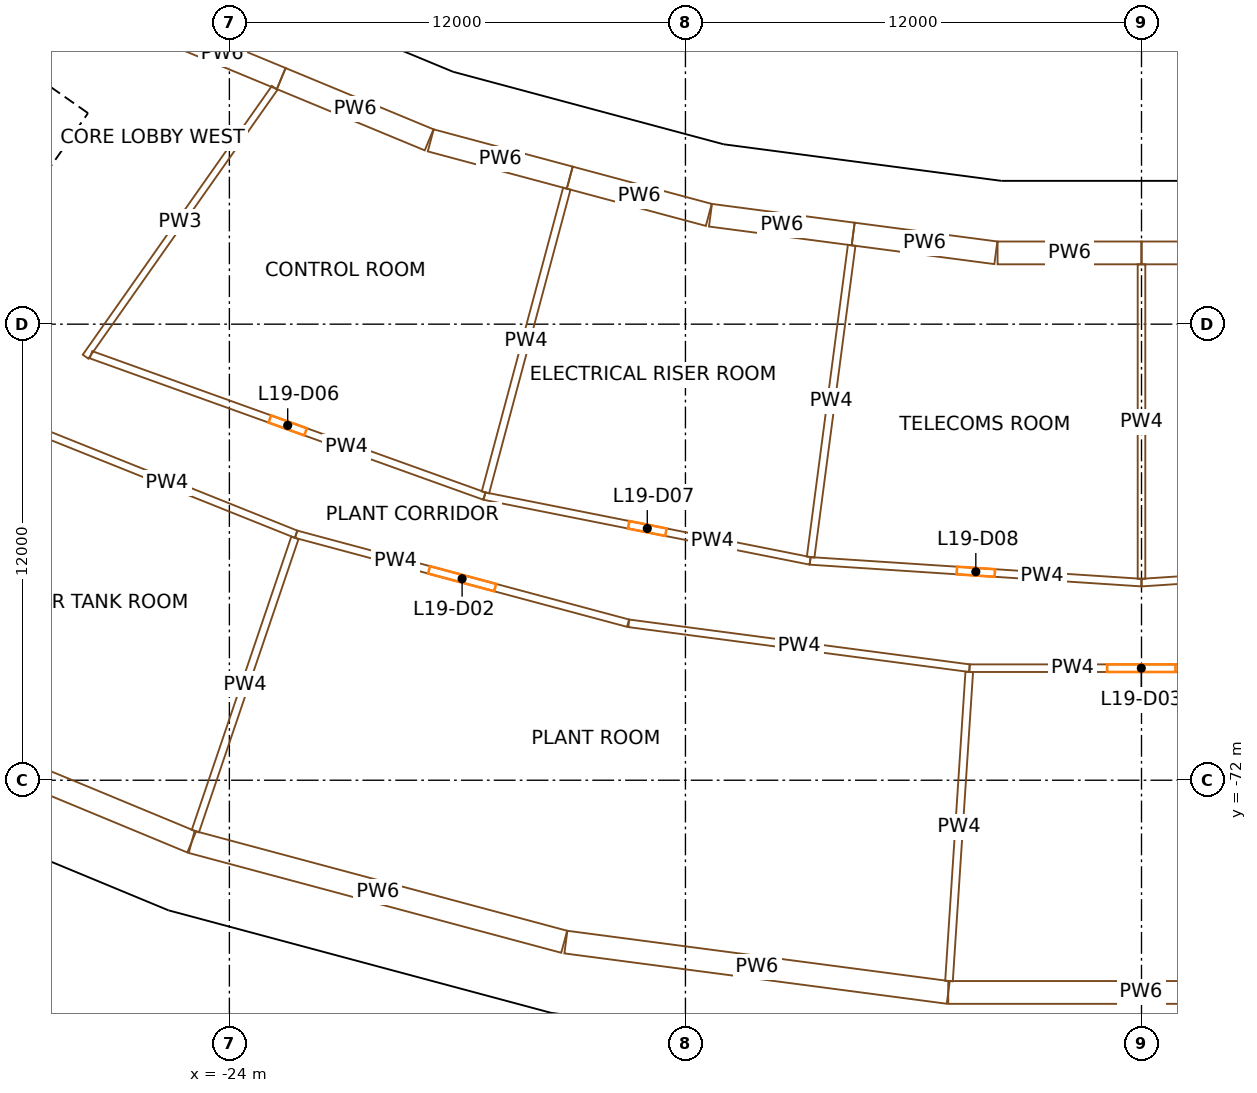
"""IFC4 building model, lengths in metres.
Left out: names, types, materials, properties, quantities, classifications, styles, units other than length and angle.
Written with IfcOpenShell. Run it as: python <this file> out.ifc"""

import sys

from ifc_helpers import new_model, si_unit, direction, frame, frame_2d, origin, origin_2d, place, context, subcontext, project, spatial, rectangle, extrude, element, fill, save


model = new_model("IFC4")
c1 = context("Model", 3, precision=1e-05, world=origin(), true_north=direction((0.0, 1.0)))
c2 = subcontext(c1, "Body", "Model", "MODEL_VIEW")
j1 = project(units=[si_unit("LENGTHUNIT", "METRE"), si_unit("PLANEANGLEUNIT", "RADIAN")], contexts=[c1])
p1 = place(None, origin())
s1 = spatial("IfcSite", under=j1, at=p1, CompositionType="ELEMENT")
p2 = place(p1, origin())
s2 = spatial("IfcBuilding", under=s1, at=p2, CompositionType="ELEMENT")
p3 = place(p2, frame((0.0, 0.0, 89.9)))
s3 = spatial("IfcBuildingStorey", under=s2, at=p3, CompositionType="ELEMENT", Elevation=89.9)
for number, where, z_axis, x_axis in (
    (1, (-25.763, -52.243, 0.0), (0.0, 0.0, 1.0), (0.897, -0.442, 0.0)),
    (2, (-18.724, -55.159, 0.0), (0.0, 0.0, 1.0), (0.947, -0.321, 0.0)),
    (3, (-24.992, -73.624, 0.0), (0.0, 0.0, 1.0), (0.947, -0.321, 0.0)),
    (4, (-11.364, -57.131, 0.0), (0.0, 0.0, 1.0), (0.981, -0.195, 0.0)),
    (5, (-15.168, -76.256, 0.0), (0.0, 0.0, 1.0), (0.981, -0.195, 0.0)),
    (6, (-3.81, -58.125, 0.0), (0.0, 0.0, 1.0), (0.998, -0.065, 0.0)),
    (7, (-5.085, -77.583, 0.0), (0.0, 0.0, 1.0), (0.998, -0.065, 0.0)),
):
    element("IfcColumn", number, at=place(p3, frame(where, z_axis=z_axis, x_axis=x_axis)), inside=s3, PredefinedType="COLUMN", context=c2, shape_type="SweptSolid", body=[
        extrude(rectangle(XDim=1.3, YDim=1.7, at=origin_2d()), origin(), (0.0, 0.0, 1.0), 5.0),
    ])
p4 = place(p3, frame((-36.717, -66.337, 0.0), z_axis=(0.0, 0.0, 1.0), x_axis=(0.573577477574, 0.819151315216, 0.0)))
e8 = element("IfcWall", 8, at=p4, inside=s3, PredefinedType="SHEAR", context=c2, shape_type="SweptSolid", body=[
    extrude(rectangle(XDim=14.8, YDim=0.9, at=frame_2d((7.4, 0.0))), origin(), (0.0, 0.0, 1.0), 4.7),
])
p5 = place(p4, frame((6.2, 0.0, 0.0)))
e9 = element("IfcOpeningElement", 9, at=p5, cuts=e8, PredefinedType="OPENING", context=c2, shape_type="SweptSolid", body=[
    extrude(rectangle(XDim=2.4, YDim=2.1, at=frame_2d((1.2, 1.05))), frame((0.0, 0.46, 0.0), z_axis=(0.0, -1.0, 0.0), x_axis=(1.0, 0.0, 0.0)), (0.0, 0.0, 1.0), 0.92),
])
p6 = place(p3, frame((-28.854, -54.324, 0.0), z_axis=(0.0, 0.0, 1.0), x_axis=(-0.819145767589, 0.573585400304, 0.0)))
e10 = element("IfcWall", 10, at=p6, inside=s3, PredefinedType="SHEAR", context=c2, shape_type="SweptSolid", body=[
    extrude(rectangle(XDim=15.045, YDim=0.9, at=frame_2d((7.523, 0.0))), origin(), (0.0, 0.0, 1.0), 4.7),
])
p7 = place(p6, frame((3.45, 0.0, 0.0)))
e11 = element("IfcOpeningElement", 11, at=p7, cuts=e10, PredefinedType="OPENING", context=c2, shape_type="SweptSolid", body=[
    extrude(rectangle(XDim=1.0, YDim=2.1, at=frame_2d((0.5, 1.05))), frame((0.0, 0.46, 0.0), z_axis=(0.0, -1.0, 0.0), x_axis=(1.0, 0.0, 0.0)), (0.0, 0.0, 1.0), 0.92),
])
p8 = place(p6, frame((13.495, 0.0, 0.0)))
e12 = element("IfcOpeningElement", 12, at=p8, cuts=e10, PredefinedType="OPENING", context=c2, shape_type="SweptSolid", body=[
    extrude(rectangle(XDim=1.1, YDim=2.1, at=frame_2d((0.55, 1.05))), frame((0.0, 0.46, 0.0), z_axis=(0.0, -1.0, 0.0), x_axis=(1.0, 0.0, 0.0)), (0.0, 0.0, 1.0), 0.92),
])
p9 = place(p3, frame((-18.155, -53.559, 0.0), z_axis=(0.0, 0.0, 1.0), x_axis=(-0.923878980802, 0.382684764306, 0.0)))
e13 = element("IfcWall", 13, at=p9, inside=s3, PredefinedType="SOLIDWALL", context=c2, shape_type="SweptSolid", body=[
    extrude(rectangle(XDim=7.447, YDim=0.4, at=frame_2d((3.724, 0.0))), origin(), (0.0, 0.0, 1.0), 3.6),
])
p10 = place(p3, frame((-11.082, -55.451, 0.0), z_axis=(0.0, 0.0, 1.0), x_axis=(-0.965926541514, 0.258816375834, 0.0)))
e14 = element("IfcWall", 14, at=p10, inside=s3, PredefinedType="SOLIDWALL", context=c2, shape_type="SweptSolid", body=[
    extrude(rectangle(XDim=7.295, YDim=0.4, at=frame_2d((3.648, 0.0))), origin(), (0.0, 0.0, 1.0), 3.6),
])
p11 = place(p3, frame((-3.674, -56.433, 0.0), z_axis=(0.0, 0.0, 1.0), x_axis=(-0.991442463474, 0.130544404786, 0.0)))
e15 = element("IfcWall", 15, at=p11, inside=s3, PredefinedType="SOLIDWALL", context=c2, shape_type="SweptSolid", body=[
    extrude(rectangle(XDim=7.447, YDim=0.4, at=frame_2d((3.724, 0.0))), origin(), (0.0, 0.0, 1.0), 3.6),
])
p12 = place(p3, frame((3.648, -56.429, 0.0), z_axis=(0.0, 0.0, 1.0), x_axis=(-1.0, 0.0, 0.0)))
e16 = element("IfcWall", 16, at=p12, inside=s3, PredefinedType="SOLIDWALL", context=c2, shape_type="SweptSolid", body=[
    extrude(rectangle(XDim=7.296, YDim=0.4, at=frame_2d((3.648, 0.0))), origin(), (0.0, 0.0, 1.0), 3.6),
])
p13 = place(p3, frame((-35.093, -71.276, 0.0), z_axis=(0.0, 0.0, 1.0), x_axis=(0.923877173549, -0.382689127353, 0.0)))
e17 = element("IfcWall", 17, at=p13, inside=s3, PredefinedType="SOLIDWALL", context=c2, shape_type="SweptSolid", body=[
    extrude(rectangle(XDim=10.291, YDim=0.4, at=frame_2d((5.146, 0.0))), origin(), (0.0, 0.0, 1.0), 3.6),
])
p14 = place(p3, frame((-25.562, -75.227, 0.0), z_axis=(0.0, 0.0, 1.0), x_axis=(0.965927701805, -0.258812045479, 0.0)))
e18 = element("IfcWall", 18, at=p14, inside=s3, PredefinedType="SOLIDWALL", context=c2, shape_type="SweptSolid", body=[
    extrude(rectangle(XDim=10.442, YDim=0.4, at=frame_2d((5.221, 0.0))), origin(), (0.0, 0.0, 1.0), 3.6),
])
p15 = place(p3, frame((-15.449, -77.93, 0.0), z_axis=(0.0, 0.0, 1.0), x_axis=(0.991444522207, -0.130528768423, 0.0)))
e19 = element("IfcWall", 19, at=p15, inside=s3, PredefinedType="SOLIDWALL", context=c2, shape_type="SweptSolid", body=[
    extrude(rectangle(XDim=10.291, YDim=0.4, at=frame_2d((5.146, 0.0))), origin(), (0.0, 0.0, 1.0), 3.6),
])
p16 = place(p3, frame((-34.11, -69.847, 0.0), z_axis=(0.0, 0.0, 1.0), x_axis=(0.923883575944, -0.382673670509, 0.0)))
e20 = element("IfcWall", 20, at=p16, inside=s3, PredefinedType="PARTITIONING", context=c2, shape_type="SweptSolid", body=[
    extrude(rectangle(XDim=9.87, YDim=0.6, at=frame_2d((4.935, 0.0))), origin(), (0.0, 0.0, 1.0), 3.6),
])
p17 = place(p3, frame((-29.038, -62.807, 0.0), z_axis=(0.0, 0.0, 1.0), x_axis=(0.928338595819, -0.371735728056, 0.0)))
e21 = element("IfcWall", 21, at=p17, inside=s3, PredefinedType="PARTITIONING", context=c2, shape_type="SweptSolid", body=[
    extrude(rectangle(XDim=7.319, YDim=0.2, at=frame_2d((3.659, 0.0))), origin(), (0.0, 0.0, 1.0), 3.6),
])
p18 = place(p3, frame((-27.642, -60.804, 0.0), z_axis=(0.0, 0.0, 1.0), x_axis=(0.941100538557, -0.338126864251, 0.0)))
e22 = element("IfcWall", 22, at=p18, inside=s3, PredefinedType="PARTITIONING", context=c2, shape_type="SweptSolid", body=[
    extrude(rectangle(XDim=11.001, YDim=0.2, at=frame_2d((5.5, 0.0))), origin(), (0.0, 0.0, 1.0), 3.6),
])
p19 = place(p18, frame((5.0, 0.0, 0.0)))
e23 = element("IfcOpeningElement", 23, at=p19, cuts=e22, PredefinedType="OPENING", context=c2, shape_type="SweptSolid", body=[
    extrude(rectangle(XDim=1.0, YDim=2.1, at=frame_2d((0.5, 1.05))), frame((0.0, 0.11, 0.0), z_axis=(0.0, -1.0, 0.0), x_axis=(1.0, 0.0, 0.0)), (0.0, 0.0, 1.0), 0.22),
])
p20 = place(p3, frame((-25.742, -52.251, 0.0), z_axis=(0.0, 0.0, 1.0), x_axis=(0.923891170736, -0.382655333997, 0.0)))
e24 = element("IfcWall", 24, at=p20, inside=s3, PredefinedType="PARTITIONING", context=c2, shape_type="SweptSolid", body=[
    extrude(rectangle(XDim=3.362, YDim=0.6, at=frame_2d((1.681, 0.0))), origin(), (0.0, 0.0, 1.0), 3.6),
])
p21 = place(p3, frame((-24.896, -73.34, 0.0), z_axis=(0.0, 0.0, 1.0), x_axis=(0.321453202328, 0.946925466292, 0.0)))
e25 = element("IfcWall", 25, at=p21, inside=s3, PredefinedType="PARTITIONING", context=c2, shape_type="SweptSolid", body=[
    extrude(rectangle(XDim=8.15, YDim=0.2, at=frame_2d((4.075, 0.0))), origin(), (0.0, 0.0, 1.0), 3.6),
])
p22 = place(p3, frame((-24.992, -73.624, 0.0), z_axis=(0.0, 0.0, 1.0), x_axis=(0.965923565769, -0.258827481333, 0.0)))
e26 = element("IfcWall", 26, at=p22, inside=s3, PredefinedType="PARTITIONING", context=c2, shape_type="SweptSolid", body=[
    extrude(rectangle(XDim=10.147, YDim=0.6, at=frame_2d((5.074, 0.0))), origin(), (0.0, 0.0, 1.0), 3.6),
])
p23 = place(p3, frame((-22.809, -53.783, 0.0), z_axis=(0.0, 0.0, 1.0), x_axis=(-0.575419971745, -0.817858090452, 0.0)))
e27 = element("IfcWall", 27, at=p23, inside=s3, PredefinedType="PARTITIONING", context=c2, shape_type="SweptSolid", body=[
    extrude(rectangle(XDim=8.647, YDim=0.18, at=frame_2d((4.324, 0.0))), origin(), (0.0, 0.0, 1.0), 3.6),
])
p24 = place(p3, frame((-22.636, -53.538, 0.0), z_axis=(0.0, 0.0, 1.0), x_axis=(0.923874116934, -0.382696506463, 0.0)))
e28 = element("IfcWall", 28, at=p24, inside=s3, PredefinedType="PARTITIONING", context=c2, shape_type="SweptSolid", body=[
    extrude(rectangle(XDim=4.212, YDim=0.6, at=frame_2d((2.106, 0.0))), origin(), (0.0, 0.0, 1.0), 3.6),
])
p25 = place(p3, frame((-13.51, -67.868, 0.0), z_axis=(0.0, 0.0, 1.0), x_axis=(-0.965925032209, 0.258822008631, 0.0)))
e29 = element("IfcWall", 29, at=p25, inside=s3, PredefinedType="PARTITIONING", context=c2, shape_type="SweptSolid", body=[
    extrude(rectangle(XDim=9.042, YDim=0.2, at=frame_2d((4.521, 0.0))), origin(), (0.0, 0.0, 1.0), 3.6),
])
p26 = place(p25, frame((3.621, 0.0, 0.0)))
e30 = element("IfcOpeningElement", 30, at=p26, cuts=e29, PredefinedType="OPENING", context=c2, shape_type="SweptSolid", body=[
    extrude(rectangle(XDim=1.8, YDim=2.4, at=frame_2d((0.9, 1.2))), frame((0.0, 0.11, 0.0), z_axis=(0.0, -1.0, 0.0), x_axis=(1.0, 0.0, 0.0)), (0.0, 0.0, 1.0), 0.22),
])
p27 = place(p3, frame((-18.702, -55.165, 0.0), z_axis=(0.0, 0.0, 1.0), x_axis=(0.965920713003, -0.258838127392, 0.0)))
e31 = element("IfcWall", 31, at=p27, inside=s3, PredefinedType="PARTITIONING", context=c2, shape_type="SweptSolid", body=[
    extrude(rectangle(XDim=3.787, YDim=0.6, at=frame_2d((1.894, 0.0))), origin(), (0.0, 0.0, 1.0), 3.6),
])
p28 = place(p3, frame((-17.289, -64.524, 0.0), z_axis=(0.0, 0.0, 1.0), x_axis=(0.980786466832, -0.195084357342, 0.0)))
e32 = element("IfcWall", 32, at=p28, inside=s3, PredefinedType="PARTITIONING", context=c2, shape_type="SweptSolid", body=[
    extrude(rectangle(XDim=8.738, YDim=0.2, at=frame_2d((4.369, 0.0))), origin(), (0.0, 0.0, 1.0), 3.6),
])
p29 = place(p28, frame((3.869, 0.0, 0.0)))
e33 = element("IfcOpeningElement", 33, at=p29, cuts=e32, PredefinedType="OPENING", context=c2, shape_type="SweptSolid", body=[
    extrude(rectangle(XDim=1.0, YDim=2.1, at=frame_2d((0.5, 1.05))), frame((0.0, 0.11, 0.0), z_axis=(0.0, -1.0, 0.0), x_axis=(1.0, 0.0, 0.0)), (0.0, 0.0, 1.0), 0.22),
])
p30 = place(p3, frame((-15.146, -76.259, 0.0), z_axis=(0.0, 0.0, 1.0), x_axis=(0.991445285184, -0.130522973018, 0.0)))
e34 = element("IfcWall", 34, at=p30, inside=s3, PredefinedType="PARTITIONING", context=c2, shape_type="SweptSolid", body=[
    extrude(rectangle(XDim=10.147, YDim=0.6, at=frame_2d((5.074, 0.0))), origin(), (0.0, 0.0, 1.0), 3.6),
])
p31 = place(p3, frame((-15.122, -56.435, 0.0), z_axis=(0.0, 0.0, 1.0), x_axis=(-0.258815723485, -0.965926716308, 0.0)))
e35 = element("IfcWall", 35, at=p31, inside=s3, PredefinedType="PARTITIONING", context=c2, shape_type="SweptSolid", body=[
    extrude(rectangle(XDim=8.275, YDim=0.2, at=frame_2d((4.137, 0.0))), origin(), (0.0, 0.0, 1.0), 3.6),
])
p32 = place(p3, frame((-15.044, -56.145, 0.0), z_axis=(0.0, 0.0, 1.0), x_axis=(0.965936829447, -0.258777977267, 0.0)))
e36 = element("IfcWall", 36, at=p32, inside=s3, PredefinedType="PARTITIONING", context=c2, shape_type="SweptSolid", body=[
    extrude(rectangle(XDim=3.787, YDim=0.6, at=frame_2d((1.894, 0.0))), origin(), (0.0, 0.0, 1.0), 3.6),
])
p33 = place(p3, frame((-13.491, -67.872, 0.0), z_axis=(0.0, 0.0, 1.0), x_axis=(0.991445838679, -0.130518768632, 0.0)))
e37 = element("IfcWall", 37, at=p33, inside=s3, PredefinedType="PARTITIONING", context=c2, shape_type="SweptSolid", body=[
    extrude(rectangle(XDim=9.042, YDim=0.2, at=frame_2d((4.521, 0.0))), origin(), (0.0, 0.0, 1.0), 3.6),
])
p34 = place(p3, frame((-11.342, -57.134, 0.0), z_axis=(0.0, 0.0, 1.0), x_axis=(0.991450564869, -0.130482862559, 0.0)))
e38 = element("IfcWall", 38, at=p34, inside=s3, PredefinedType="PARTITIONING", context=c2, shape_type="SweptSolid", body=[
    extrude(rectangle(XDim=3.787, YDim=0.6, at=frame_2d((1.894, 0.0))), origin(), (0.0, 0.0, 1.0), 3.6),
])
p35 = place(p3, frame((-8.719, -66.229, 0.0), z_axis=(0.0, 0.0, 1.0), x_axis=(0.997858593599, -0.065408158359, 0.0)))
e39 = element("IfcWall", 39, at=p35, inside=s3, PredefinedType="PARTITIONING", context=c2, shape_type="SweptSolid", body=[
    extrude(rectangle(XDim=8.738, YDim=0.2, at=frame_2d((4.369, 0.0))), origin(), (0.0, 0.0, 1.0), 3.6),
])
p36 = place(p35, frame((3.869, 0.0, 0.0)))
e40 = element("IfcOpeningElement", 40, at=p36, cuts=e39, PredefinedType="OPENING", context=c2, shape_type="SweptSolid", body=[
    extrude(rectangle(XDim=1.0, YDim=2.1, at=frame_2d((0.5, 1.05))), frame((0.0, 0.11, 0.0), z_axis=(0.0, -1.0, 0.0), x_axis=(1.0, 0.0, 0.0)), (0.0, 0.0, 1.0), 0.22),
])
p37 = place(p3, frame((-7.626, -57.926, 0.0), z_axis=(0.0, 0.0, 1.0), x_axis=(-0.130528544963, -0.991444551626, 0.0)))
e41 = element("IfcWall", 41, at=p37, inside=s3, PredefinedType="PARTITIONING", context=c2, shape_type="SweptSolid", body=[
    extrude(rectangle(XDim=8.275, YDim=0.2, at=frame_2d((4.137, 0.0))), origin(), (0.0, 0.0, 1.0), 3.6),
])
p38 = place(p3, frame((-7.587, -57.628, 0.0), z_axis=(0.0, 0.0, 1.0), x_axis=(0.991442222886, -0.130546231962, 0.0)))
e42 = element("IfcWall", 42, at=p38, inside=s3, PredefinedType="PARTITIONING", context=c2, shape_type="SweptSolid", body=[
    extrude(rectangle(XDim=3.787, YDim=0.6, at=frame_2d((1.894, 0.0))), origin(), (0.0, 0.0, 1.0), 3.6),
])
p39 = place(p3, frame((-5.065, -77.284, 0.0), z_axis=(0.0, 0.0, 1.0), x_axis=(0.065393635367, 0.997859545454, 0.0)))
e43 = element("IfcWall", 43, at=p39, inside=s3, PredefinedType="PARTITIONING", context=c2, shape_type="SweptSolid", body=[
    extrude(rectangle(XDim=8.15, YDim=0.2, at=frame_2d((4.075, 0.0))), origin(), (0.0, 0.0, 1.0), 3.6),
])
p40 = place(p3, frame((-5.085, -77.583, 0.0), z_axis=(0.0, 0.0, 1.0), x_axis=(1.0, 0.0, 0.0)))
e44 = element("IfcWall", 44, at=p40, inside=s3, PredefinedType="PARTITIONING", context=c2, shape_type="SweptSolid", body=[
    extrude(rectangle(XDim=10.148, YDim=0.6, at=frame_2d((5.074, 0.0))), origin(), (0.0, 0.0, 1.0), 3.6),
])
p41 = place(p3, frame((4.516, -69.052, 0.0), z_axis=(0.0, 0.0, 1.0), x_axis=(-1.0, 0.0, 0.0)))
e45 = element("IfcWall", 45, at=p41, inside=s3, PredefinedType="PARTITIONING", context=c2, shape_type="SweptSolid", body=[
    extrude(rectangle(XDim=9.042, YDim=0.2, at=frame_2d((4.521, 0.0))), origin(), (0.0, 0.0, 1.0), 3.6),
])
p42 = place(p41, frame((3.621, 0.0, 0.0)))
e46 = element("IfcOpeningElement", 46, at=p42, cuts=e45, PredefinedType="OPENING", context=c2, shape_type="SweptSolid", body=[
    extrude(rectangle(XDim=1.8, YDim=2.4, at=frame_2d((0.9, 1.2))), frame((0.0, 0.11, 0.0), z_axis=(0.0, -1.0, 0.0), x_axis=(1.0, 0.0, 0.0)), (0.0, 0.0, 1.0), 0.22),
])
p43 = place(p3, frame((-3.787, -58.125, 0.0), z_axis=(0.0, 0.0, 1.0), x_axis=(1.0, 0.0, 0.0)))
e47 = element("IfcWall", 47, at=p43, inside=s3, PredefinedType="PARTITIONING", context=c2, shape_type="SweptSolid", body=[
    extrude(rectangle(XDim=3.787, YDim=0.6, at=frame_2d((1.894, 0.0))), origin(), (0.0, 0.0, 1.0), 3.6),
])
p44 = place(p3, frame((0.0, -66.8, 0.0), z_axis=(0.0, 0.0, 1.0), x_axis=(0.997858593599, 0.065408158359, 0.0)))
e48 = element("IfcWall", 48, at=p44, inside=s3, PredefinedType="PARTITIONING", context=c2, shape_type="SweptSolid", body=[
    extrude(rectangle(XDim=8.738, YDim=0.2, at=frame_2d((4.369, 0.0))), origin(), (0.0, 0.0, 1.0), 3.6),
])
p45 = place(p44, frame((3.869, 0.0, 0.0)))
e49 = element("IfcOpeningElement", 49, at=p45, cuts=e48, PredefinedType="OPENING", context=c2, shape_type="SweptSolid", body=[
    extrude(rectangle(XDim=1.0, YDim=2.1, at=frame_2d((0.5, 1.05))), frame((0.0, 0.11, 0.0), z_axis=(0.0, -1.0, 0.0), x_axis=(1.0, 0.0, 0.0)), (0.0, 0.0, 1.0), 0.22),
])
p46 = place(p3, frame((0.0, -58.425, 0.0), z_axis=(0.0, 0.0, 1.0), x_axis=(0.0, -1.0, 0.0)))
e50 = element("IfcWall", 50, at=p46, inside=s3, PredefinedType="PARTITIONING", context=c2, shape_type="SweptSolid", body=[
    extrude(rectangle(XDim=8.275, YDim=0.2, at=frame_2d((4.137, 0.0))), origin(), (0.0, 0.0, 1.0), 3.6),
])
p47 = place(p3, frame((0.0, -58.125, 0.0), z_axis=(0.0, 0.0, 1.0), x_axis=(1.0, 0.0, 0.0)))
e51 = element("IfcWall", 51, at=p47, inside=s3, PredefinedType="PARTITIONING", context=c2, shape_type="SweptSolid", body=[
    extrude(rectangle(XDim=3.787, YDim=0.6, at=frame_2d((1.894, 0.0))), origin(), (0.0, 0.0, 1.0), 3.6),
])
p48 = place(p26, origin())
e52 = element("IfcDoor", 52, at=p48, inside=s3, OperationType="DOUBLE_DOOR_SINGLE_SWING", PredefinedType="DOOR", context=c2, shape_type="SweptSolid", body=[
    extrude(rectangle(XDim=1.8, YDim=2.4, at=frame_2d((0.9, 1.2))), frame((0.0, 0.025, 0.0), z_axis=(0.0, -1.0, 0.0), x_axis=(1.0, 0.0, 0.0)), (0.0, 0.0, 1.0), 0.05),
])
fill(e30, e52)
p49 = place(p42, origin())
e53 = element("IfcDoor", 53, at=p49, inside=s3, OperationType="DOUBLE_DOOR_SINGLE_SWING", PredefinedType="DOOR", context=c2, shape_type="SweptSolid", body=[
    extrude(rectangle(XDim=1.8, YDim=2.4, at=frame_2d((0.9, 1.2))), frame((0.0, 0.025, 0.0), z_axis=(0.0, -1.0, 0.0), x_axis=(1.0, 0.0, 0.0)), (0.0, 0.0, 1.0), 0.05),
])
fill(e46, e53)
p50 = place(p19, origin())
e54 = element("IfcDoor", 54, at=p50, inside=s3, OperationType="SINGLE_SWING_RIGHT", PredefinedType="DOOR", context=c2, shape_type="SweptSolid", body=[
    extrude(rectangle(XDim=1.0, YDim=2.1, at=frame_2d((0.5, 1.05))), frame((0.0, 0.025, 0.0), z_axis=(0.0, -1.0, 0.0), x_axis=(1.0, 0.0, 0.0)), (0.0, 0.0, 1.0), 0.05),
])
fill(e23, e54)
p51 = place(p29, origin())
e55 = element("IfcDoor", 55, at=p51, inside=s3, OperationType="SINGLE_SWING_RIGHT", PredefinedType="DOOR", context=c2, shape_type="SweptSolid", body=[
    extrude(rectangle(XDim=1.0, YDim=2.1, at=frame_2d((0.5, 1.05))), frame((0.0, 0.025, 0.0), z_axis=(0.0, -1.0, 0.0), x_axis=(1.0, 0.0, 0.0)), (0.0, 0.0, 1.0), 0.05),
])
fill(e33, e55)
p52 = place(p36, origin())
e56 = element("IfcDoor", 56, at=p52, inside=s3, OperationType="SINGLE_SWING_RIGHT", PredefinedType="DOOR", context=c2, shape_type="SweptSolid", body=[
    extrude(rectangle(XDim=1.0, YDim=2.1, at=frame_2d((0.5, 1.05))), frame((0.0, 0.025, 0.0), z_axis=(0.0, -1.0, 0.0), x_axis=(1.0, 0.0, 0.0)), (0.0, 0.0, 1.0), 0.05),
])
fill(e40, e56)
save(model, sys.argv[1])
